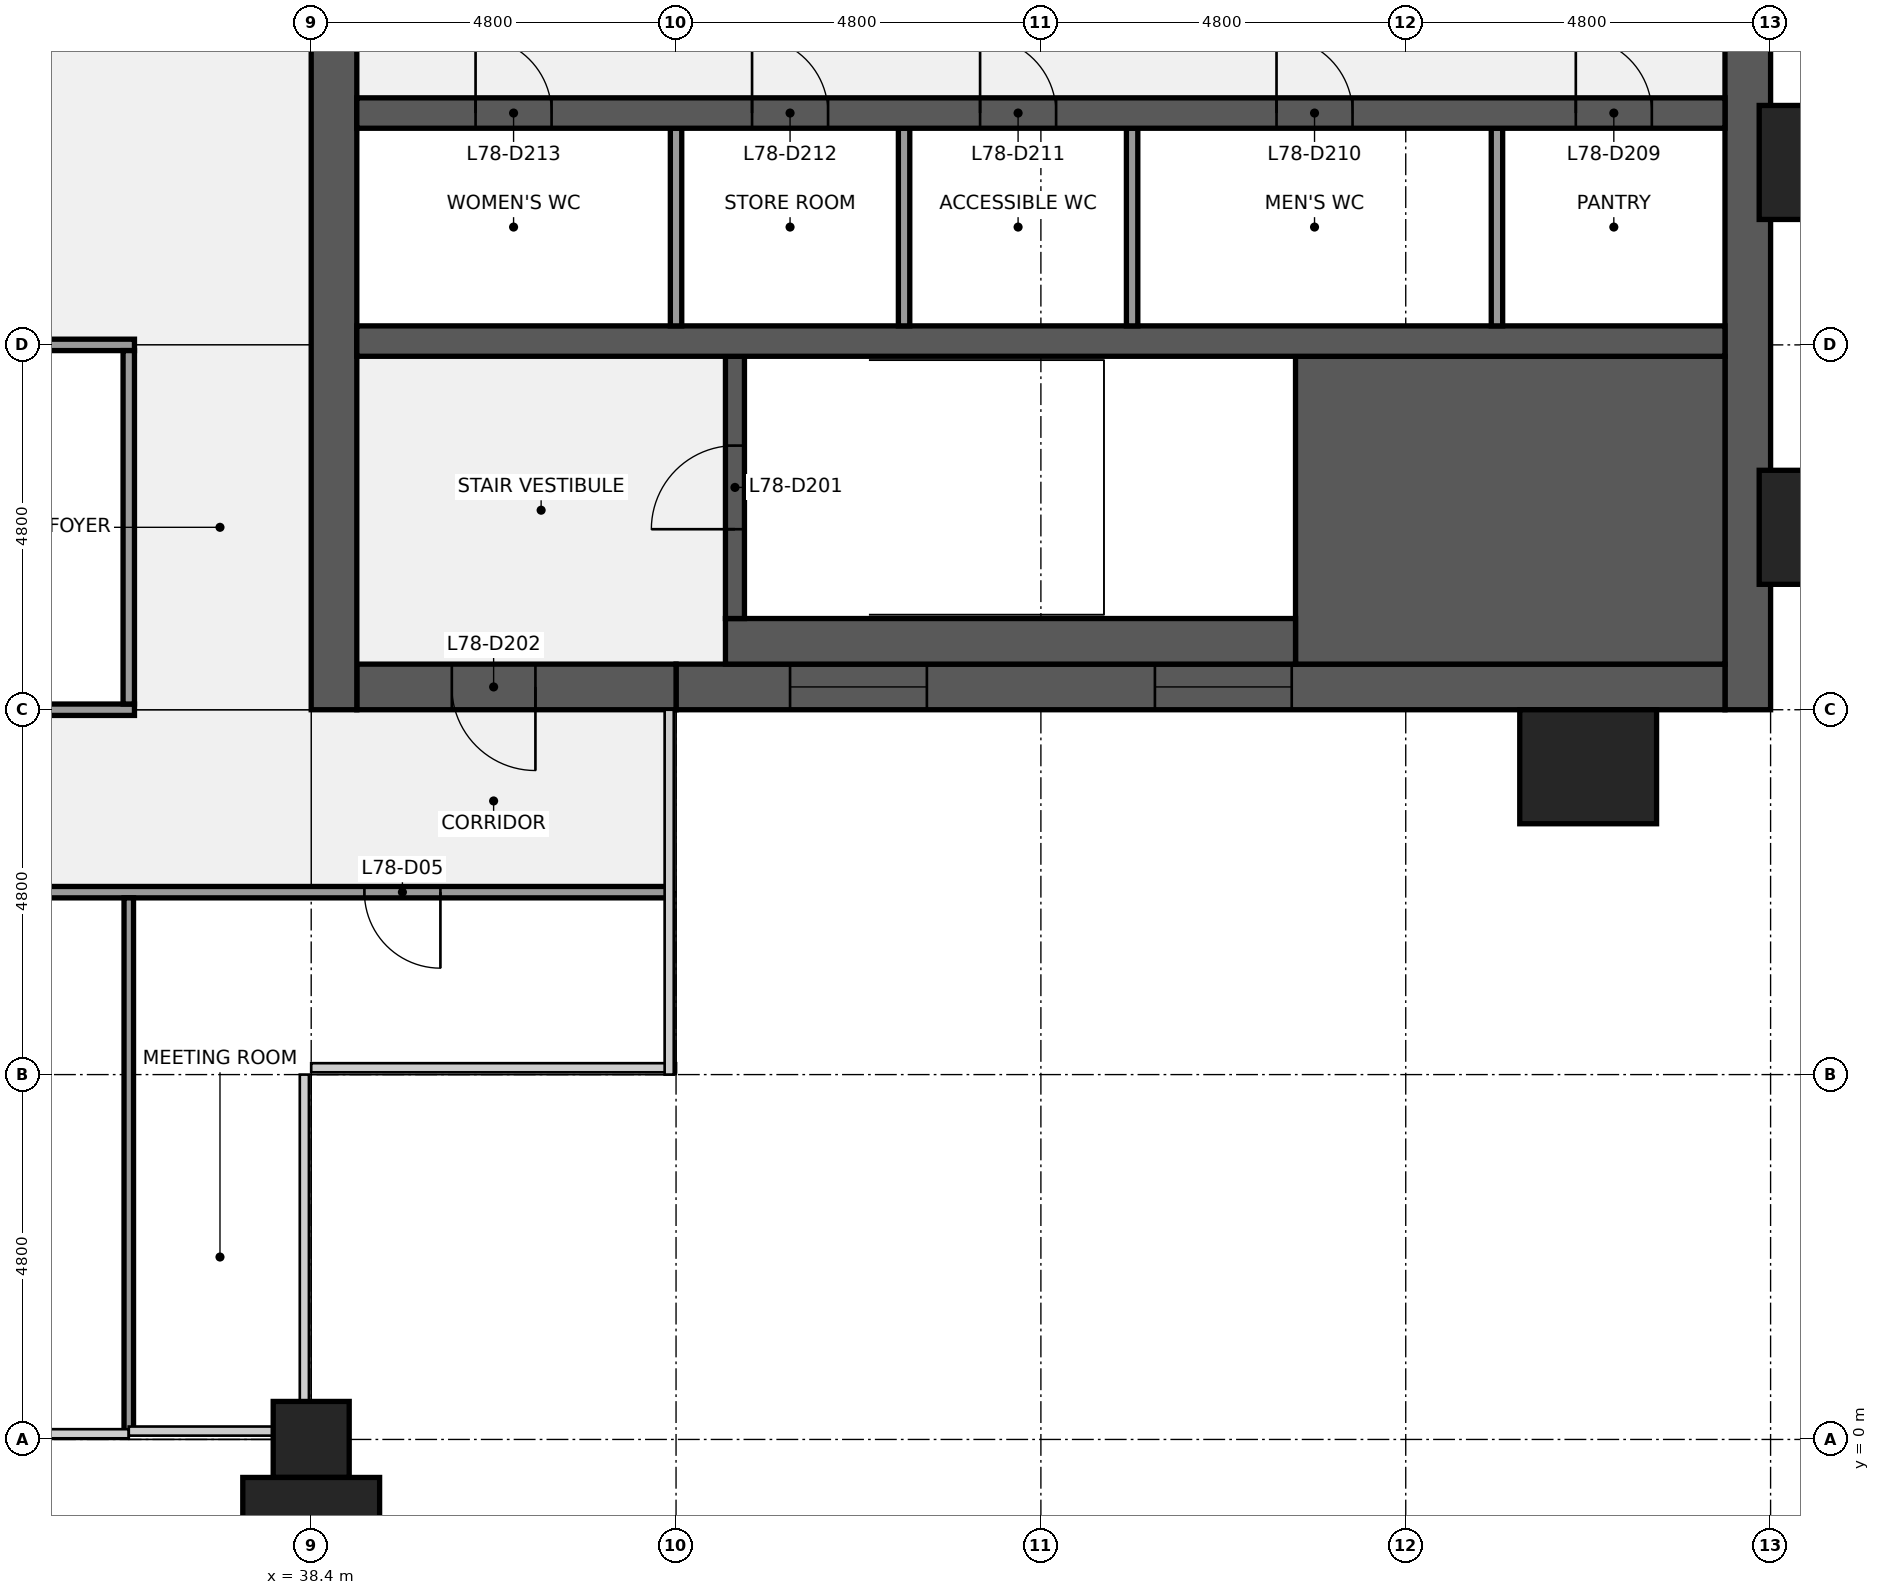
"""IFC4 building model, lengths in metres.
Left out: names, types, materials, properties, quantities, classifications, styles, units other than length and angle.
Written with IfcOpenShell. Run it as: python <this file> out.ifc"""

import sys

from ifc_helpers import new_model, si_unit, direction, frame, frame_2d, origin, origin_2d, place, context, subcontext, project, spatial, rectangle, extrude, element, fill, save


model = new_model("IFC4")
c1 = context("Model", 3, precision=1e-05, world=origin(), true_north=direction((0.0, 1.0)))
c2 = subcontext(c1, "Body", "Model", "MODEL_VIEW")
j1 = project(units=[si_unit("LENGTHUNIT", "METRE"), si_unit("PLANEANGLEUNIT", "RADIAN")], contexts=[c1])
p1 = place(None, origin())
s1 = spatial("IfcSite", under=j1, at=p1, CompositionType="ELEMENT")
p2 = place(p1, origin())
s2 = spatial("IfcBuilding", under=s1, at=p2, CompositionType="ELEMENT")
p3 = place(p2, frame((0.0, 0.0, 350.3)))
s3 = spatial("IfcBuildingStorey", under=s2, at=p3, CompositionType="ELEMENT", Elevation=350.3)
p4 = place(p3, frame((38.4, 0.0, 0.0), z_axis=(0.0, 0.0, 1.0), x_axis=(1.0, 0.0, 0.0)))
e1 = element("IfcColumn", 1, at=p4, inside=s3, PredefinedType="COLUMN", context=c2, shape_type="SweptSolid", body=[
    extrude(rectangle(XDim=1.0, YDim=1.0, at=origin_2d()), origin(), (0.0, 0.0, 1.0), 4.0),
])
p5 = place(p3, frame((57.3, 38.4, 0.0), z_axis=(0.0, 0.0, 1.0), x_axis=(0.0, -1.0, 0.0)))
e2 = element("IfcWall", 2, at=p5, inside=s3, PredefinedType="SHEAR", context=c2, shape_type="SweptSolid", body=[
    extrude(rectangle(XDim=28.8, YDim=0.6, at=frame_2d((14.4, 0.0))), origin(), (0.0, 0.0, 1.0), 3.75),
])
p6 = place(p5, frame((18.45, 0.0, 0.9)))
e3 = element("IfcOpeningElement", 3, at=p6, cuts=e2, PredefinedType="OPENING", context=c2, shape_type="SweptSolid", body=[
    extrude(rectangle(XDim=1.5, YDim=1.5, at=frame_2d((0.75, 0.75))), frame((0.0, 0.31, 0.0), z_axis=(0.0, -1.0, 0.0), x_axis=(1.0, 0.0, 0.0)), (0.0, 0.0, 1.0), 0.62),
])
p7 = place(p5, frame((8.85, 0.0, 0.9)))
e4 = element("IfcOpeningElement", 4, at=p7, cuts=e2, PredefinedType="OPENING", context=c2, shape_type="SweptSolid", body=[
    extrude(rectangle(XDim=1.5, YDim=1.5, at=frame_2d((0.75, 0.75))), frame((0.0, 0.31, 0.0), z_axis=(0.0, -1.0, 0.0), x_axis=(1.0, 0.0, 0.0)), (0.0, 0.0, 1.0), 0.62),
])
p8 = place(p3, frame((57.0, 9.9, 0.0), z_axis=(0.0, 0.0, 1.0), x_axis=(-1.0, 0.0, 0.0)))
e5 = element("IfcWall", 5, at=p8, inside=s3, PredefinedType="SHEAR", context=c2, shape_type="SweptSolid", body=[
    extrude(rectangle(XDim=13.8, YDim=0.6, at=frame_2d((6.9, 0.0))), origin(), (0.0, 0.0, 1.0), 3.75),
])
p9 = place(p8, frame((5.7, 0.0, 0.9)))
e6 = element("IfcOpeningElement", 6, at=p9, cuts=e5, PredefinedType="OPENING", context=c2, shape_type="SweptSolid", body=[
    extrude(rectangle(XDim=1.8, YDim=1.5, at=frame_2d((0.9, 0.75))), frame((0.0, 0.31, 0.0), z_axis=(0.0, -1.0, 0.0), x_axis=(1.0, 0.0, 0.0)), (0.0, 0.0, 1.0), 0.62),
])
p10 = place(p8, frame((10.5, 0.0, 0.9)))
e7 = element("IfcOpeningElement", 7, at=p10, cuts=e5, PredefinedType="OPENING", context=c2, shape_type="SweptSolid", body=[
    extrude(rectangle(XDim=1.8, YDim=1.5, at=frame_2d((0.9, 0.75))), frame((0.0, 0.31, 0.0), z_axis=(0.0, -1.0, 0.0), x_axis=(1.0, 0.0, 0.0)), (0.0, 0.0, 1.0), 0.62),
])
p11 = place(p3, frame((43.2, 9.9, 0.0), z_axis=(0.0, 0.0, 1.0), x_axis=(-1.0, 0.0, 0.0)))
e8 = element("IfcWall", 8, at=p11, inside=s3, PredefinedType="SHEAR", context=c2, shape_type="SweptSolid", body=[
    extrude(rectangle(XDim=4.2, YDim=0.6, at=frame_2d((2.1, 0.0))), origin(), (0.0, 0.0, 1.0), 3.75),
])
p12 = place(p11, frame((1.85, 0.0, 0.0)))
e9 = element("IfcOpeningElement", 9, at=p12, cuts=e8, PredefinedType="OPENING", context=c2, shape_type="SweptSolid", body=[
    extrude(rectangle(XDim=1.1, YDim=2.1, at=frame_2d((0.55, 1.05))), frame((0.0, 0.31, 0.0), z_axis=(0.0, -1.0, 0.0), x_axis=(1.0, 0.0, 0.0)), (0.0, 0.0, 1.0), 0.62),
])
p13 = place(p3, frame((38.7, 9.6, 0.0), z_axis=(0.0, 0.0, 1.0), x_axis=(0.0, 1.0, 0.0)))
e10 = element("IfcWall", 10, at=p13, inside=s3, PredefinedType="SHEAR", context=c2, shape_type="SweptSolid", body=[
    extrude(rectangle(XDim=28.8, YDim=0.6, at=frame_2d((14.4, 0.0))), origin(), (0.0, 0.0, 1.0), 3.75),
])
p14 = place(p13, frame((8.7, 0.0, 0.0)))
e11 = element("IfcOpeningElement", 11, at=p14, cuts=e10, PredefinedType="OPENING", context=c2, shape_type="SweptSolid", body=[
    extrude(rectangle(XDim=1.8, YDim=2.1, at=frame_2d((0.9, 1.05))), frame((0.0, 0.31, 0.0), z_axis=(0.0, -1.0, 0.0), x_axis=(1.0, 0.0, 0.0)), (0.0, 0.0, 1.0), 0.62),
])
p15 = place(p13, frame((18.3, 0.0, 0.0)))
e12 = element("IfcOpeningElement", 12, at=p15, cuts=e10, PredefinedType="OPENING", context=c2, shape_type="SweptSolid", body=[
    extrude(rectangle(XDim=1.8, YDim=2.1, at=frame_2d((0.9, 1.05))), frame((0.0, 0.31, 0.0), z_axis=(0.0, -1.0, 0.0), x_axis=(1.0, 0.0, 0.0)), (0.0, 0.0, 1.0), 0.62),
])
p16 = place(p3, frame((51.35, 12.225, 0.0), z_axis=(0.0, 0.0, 1.0), x_axis=(1.0, 0.0, 0.0)))
e13 = element("IfcWall", 13, at=p16, inside=s3, PredefinedType="SHEAR", context=c2, shape_type="SweptSolid", body=[
    extrude(rectangle(XDim=5.65, YDim=4.05, at=frame_2d((2.825, 0.0))), origin(), (0.0, 0.0, 1.0), 3.75),
])
p17 = place(p3, frame((43.85, 10.5, 0.0), z_axis=(0.0, 0.0, 1.0), x_axis=(1.0, 0.0, 0.0)))
e14 = element("IfcWall", 14, at=p17, inside=s3, PredefinedType="SHEAR", context=c2, shape_type="SweptSolid", body=[
    extrude(rectangle(XDim=7.5, YDim=0.6, at=frame_2d((3.75, 0.0))), origin(), (0.0, 0.0, 1.0), 3.75),
])
p18 = place(p3, frame((43.975, 10.8, 0.0), z_axis=(0.0, 0.0, 1.0), x_axis=(0.0, 1.0, 0.0)))
e15 = element("IfcWall", 15, at=p18, inside=s3, PredefinedType="SHEAR", context=c2, shape_type="SweptSolid", body=[
    extrude(rectangle(XDim=3.45, YDim=0.25, at=frame_2d((1.725, 0.0))), origin(), (0.0, 0.0, 1.0), 3.75),
])
p19 = place(p18, frame((1.175, 0.0, 0.0)))
e16 = element("IfcOpeningElement", 16, at=p19, cuts=e15, PredefinedType="OPENING", context=c2, shape_type="SweptSolid", body=[
    extrude(rectangle(XDim=1.1, YDim=2.1, at=frame_2d((0.55, 1.05))), frame((0.0, 0.135, 0.0), z_axis=(0.0, -1.0, 0.0), x_axis=(1.0, 0.0, 0.0)), (0.0, 0.0, 1.0), 0.27),
])
p20 = place(p3, frame((39.0, 14.45, 0.0), z_axis=(0.0, 0.0, 1.0), x_axis=(1.0, 0.0, 0.0)))
e17 = element("IfcWall", 17, at=p20, inside=s3, PredefinedType="SHEAR", context=c2, shape_type="SweptSolid", body=[
    extrude(rectangle(XDim=18.0, YDim=0.4, at=frame_2d((9.0, 0.0))), origin(), (0.0, 0.0, 1.0), 3.75),
])
for number, where, z_axis, x_axis in (
    (18, (54.0, 14.65, 0.0), (0.0, 0.0, 1.0), (0.0, 1.0, 0.0)),
    (19, (49.2, 14.65, 0.0), (0.0, 0.0, 1.0), (0.0, 1.0, 0.0)),
    (20, (46.2, 14.65, 0.0), (0.0, 0.0, 1.0), (0.0, 1.0, 0.0)),
    (21, (43.2, 14.65, 0.0), (0.0, 0.0, 1.0), (0.0, 1.0, 0.0)),
):
    element("IfcWall", number, at=place(p3, frame(where, z_axis=z_axis, x_axis=x_axis)), inside=s3, PredefinedType="PARTITIONING", context=c2, shape_type="SweptSolid", body=[
        extrude(rectangle(XDim=2.6, YDim=0.15, at=frame_2d((1.3, 0.0))), origin(), (0.0, 0.0, 1.0), 3.75),
    ])
p21 = place(p3, frame((39.0, 17.45, 0.0), z_axis=(0.0, 0.0, 1.0), x_axis=(1.0, 0.0, 0.0)))
e22 = element("IfcWall", 22, at=p21, inside=s3, PredefinedType="SHEAR", context=c2, shape_type="SweptSolid", body=[
    extrude(rectangle(XDim=18.0, YDim=0.4, at=frame_2d((9.0, 0.0))), origin(), (0.0, 0.0, 1.0), 3.75),
])
p22 = place(p21, frame((16.038, 0.0, 0.0)))
e23 = element("IfcOpeningElement", 23, at=p22, cuts=e22, PredefinedType="OPENING", context=c2, shape_type="SweptSolid", body=[
    extrude(rectangle(XDim=1.0, YDim=2.1, at=frame_2d((0.5, 1.05))), frame((0.0, 0.21, 0.0), z_axis=(0.0, -1.0, 0.0), x_axis=(1.0, 0.0, 0.0)), (0.0, 0.0, 1.0), 0.42),
])
p23 = place(p21, frame((12.1, 0.0, 0.0)))
e24 = element("IfcOpeningElement", 24, at=p23, cuts=e22, PredefinedType="OPENING", context=c2, shape_type="SweptSolid", body=[
    extrude(rectangle(XDim=1.0, YDim=2.1, at=frame_2d((0.5, 1.05))), frame((0.0, 0.21, 0.0), z_axis=(0.0, -1.0, 0.0), x_axis=(1.0, 0.0, 0.0)), (0.0, 0.0, 1.0), 0.42),
])
p24 = place(p21, frame((8.2, 0.0, 0.0)))
e25 = element("IfcOpeningElement", 25, at=p24, cuts=e22, PredefinedType="OPENING", context=c2, shape_type="SweptSolid", body=[
    extrude(rectangle(XDim=1.0, YDim=2.1, at=frame_2d((0.5, 1.05))), frame((0.0, 0.21, 0.0), z_axis=(0.0, -1.0, 0.0), x_axis=(1.0, 0.0, 0.0)), (0.0, 0.0, 1.0), 0.42),
])
p25 = place(p21, frame((5.2, 0.0, 0.0)))
e26 = element("IfcOpeningElement", 26, at=p25, cuts=e22, PredefinedType="OPENING", context=c2, shape_type="SweptSolid", body=[
    extrude(rectangle(XDim=1.0, YDim=2.1, at=frame_2d((0.5, 1.05))), frame((0.0, 0.21, 0.0), z_axis=(0.0, -1.0, 0.0), x_axis=(1.0, 0.0, 0.0)), (0.0, 0.0, 1.0), 0.42),
])
p26 = place(p21, frame((1.562, 0.0, 0.0)))
e27 = element("IfcOpeningElement", 27, at=p26, cuts=e22, PredefinedType="OPENING", context=c2, shape_type="SweptSolid", body=[
    extrude(rectangle(XDim=1.0, YDim=2.1, at=frame_2d((0.5, 1.05))), frame((0.0, 0.21, 0.0), z_axis=(0.0, -1.0, 0.0), x_axis=(1.0, 0.0, 0.0)), (0.0, 0.0, 1.0), 0.42),
])
p27 = place(p3, frame((14.5, 7.2, 0.0), z_axis=(0.0, 0.0, 1.0), x_axis=(1.0, 0.0, 0.0)))
e28 = element("IfcWall", 28, at=p27, inside=s3, PredefinedType="PARTITIONING", context=c2, shape_type="SweptSolid", body=[
    extrude(rectangle(XDim=28.6, YDim=0.15, at=frame_2d((14.3, 0.0))), origin(), (0.0, 0.0, 1.0), 2.759),
])
p28 = place(p27, frame((1.85, 0.0, 0.0)))
e29 = element("IfcOpeningElement", 29, at=p28, cuts=e28, PredefinedType="OPENING", context=c2, shape_type="SweptSolid", body=[
    extrude(rectangle(XDim=1.0, YDim=2.1, at=frame_2d((0.5, 1.05))), frame((0.0, 0.085, 0.0), z_axis=(0.0, -1.0, 0.0), x_axis=(1.0, 0.0, 0.0)), (0.0, 0.0, 1.0), 0.17),
])
p29 = place(p27, frame((9.0, 0.0, 0.0)))
e30 = element("IfcOpeningElement", 30, at=p29, cuts=e28, PredefinedType="OPENING", context=c2, shape_type="SweptSolid", body=[
    extrude(rectangle(XDim=1.0, YDim=2.1, at=frame_2d((0.5, 1.05))), frame((0.0, 0.085, 0.0), z_axis=(0.0, -1.0, 0.0), x_axis=(1.0, 0.0, 0.0)), (0.0, 0.0, 1.0), 0.17),
])
p30 = place(p27, frame((15.0, 0.0, 0.0)))
e31 = element("IfcOpeningElement", 31, at=p30, cuts=e28, PredefinedType="OPENING", context=c2, shape_type="SweptSolid", body=[
    extrude(rectangle(XDim=1.0, YDim=2.1, at=frame_2d((0.5, 1.05))), frame((0.0, 0.085, 0.0), z_axis=(0.0, -1.0, 0.0), x_axis=(1.0, 0.0, 0.0)), (0.0, 0.0, 1.0), 0.17),
])
p31 = place(p27, frame((18.6, 0.0, 0.0)))
e32 = element("IfcOpeningElement", 32, at=p31, cuts=e28, PredefinedType="OPENING", context=c2, shape_type="SweptSolid", body=[
    extrude(rectangle(XDim=1.0, YDim=2.1, at=frame_2d((0.5, 1.05))), frame((0.0, 0.085, 0.0), z_axis=(0.0, -1.0, 0.0), x_axis=(1.0, 0.0, 0.0)), (0.0, 0.0, 1.0), 0.17),
])
p32 = place(p27, frame((24.6, 0.0, 0.0)))
e33 = element("IfcOpeningElement", 33, at=p32, cuts=e28, PredefinedType="OPENING", context=c2, shape_type="SweptSolid", body=[
    extrude(rectangle(XDim=1.0, YDim=2.1, at=frame_2d((0.5, 1.05))), frame((0.0, 0.085, 0.0), z_axis=(0.0, -1.0, 0.0), x_axis=(1.0, 0.0, 0.0)), (0.0, 0.0, 1.0), 0.17),
])
p33 = place(p3, frame((21.525, 9.6, 0.0), z_axis=(0.0, 0.0, 1.0), x_axis=(1.0, 0.0, 0.0)))
e34 = element("IfcWall", 34, at=p33, inside=s3, PredefinedType="PARTITIONING", context=c2, shape_type="SweptSolid", body=[
    extrude(rectangle(XDim=14.55, YDim=0.15, at=frame_2d((7.275, 0.0))), origin(), (0.0, 0.0, 1.0), 2.759),
])
p34 = place(p33, frame((3.775, 0.0, 0.0)))
e35 = element("IfcOpeningElement", 35, at=p34, cuts=e34, PredefinedType="OPENING", context=c2, shape_type="SweptSolid", body=[
    extrude(rectangle(XDim=1.0, YDim=2.1, at=frame_2d((0.5, 1.05))), frame((0.0, 0.085, 0.0), z_axis=(0.0, -1.0, 0.0), x_axis=(1.0, 0.0, 0.0)), (0.0, 0.0, 1.0), 0.17),
])
p35 = place(p33, frame((10.975, 0.0, 0.0)))
e36 = element("IfcOpeningElement", 36, at=p35, cuts=e34, PredefinedType="OPENING", context=c2, shape_type="SweptSolid", body=[
    extrude(rectangle(XDim=1.0, YDim=2.1, at=frame_2d((0.5, 1.05))), frame((0.0, 0.085, 0.0), z_axis=(0.0, -1.0, 0.0), x_axis=(1.0, 0.0, 0.0)), (0.0, 0.0, 1.0), 0.17),
])
p36 = place(p3, frame((33.675, 14.4, 0.0), z_axis=(0.0, 0.0, 1.0), x_axis=(1.0, 0.0, 0.0)))
e37 = element("IfcWall", 37, at=p36, inside=s3, PredefinedType="PARTITIONING", context=c2, shape_type="SweptSolid", body=[
    extrude(rectangle(XDim=2.4, YDim=0.15, at=frame_2d((1.2, 0.0))), origin(), (0.0, 0.0, 1.0), 2.759),
])
p37 = place(p3, frame((36.0, 0.1, 0.0), z_axis=(0.0, 0.0, 1.0), x_axis=(0.0, 1.0, 0.0)))
e38 = element("IfcWall", 38, at=p37, inside=s3, PredefinedType="PARTITIONING", context=c2, shape_type="SweptSolid", body=[
    extrude(rectangle(XDim=7.025, YDim=0.125, at=frame_2d((3.512, 0.0))), origin(), (0.0, 0.0, 1.0), 2.759),
])
p38 = place(p3, frame((36.0, 9.675, 0.0), z_axis=(0.0, 0.0, 1.0), x_axis=(0.0, 1.0, 0.0)))
e39 = element("IfcWall", 39, at=p38, inside=s3, PredefinedType="PARTITIONING", context=c2, shape_type="SweptSolid", body=[
    extrude(rectangle(XDim=4.65, YDim=0.15, at=frame_2d((2.325, 0.0))), origin(), (0.0, 0.0, 1.0), 2.759),
])
for number, where, z_axis, x_axis in (
    (40, (55.2, 8.85, 0.0), (0.0, 0.0, 1.0), (1.0, 0.0, 0.0)),
    (41, (58.35, 12.0, 0.0), (0.0, 0.0, 1.0), (0.0, 1.0, 0.0)),
    (42, (58.35, 16.8, 0.0), (0.0, 0.0, 1.0), (0.0, 1.0, 0.0)),
):
    element("IfcColumn", number, at=place(p3, frame(where, z_axis=z_axis, x_axis=x_axis)), inside=s3, PredefinedType="PILASTER", context=c2, shape_type="SweptSolid", body=[
        extrude(rectangle(XDim=1.8, YDim=1.5, at=origin_2d()), origin(), (0.0, 0.0, 1.0), 4.0),
    ])
p39 = place(p3, frame((38.4, -1.0, 0.0), z_axis=(0.0, 0.0, 1.0), x_axis=(1.0, 0.0, 0.0)))
e43 = element("IfcColumn", 43, at=p39, inside=s3, PredefinedType="PILASTER", context=c2, shape_type="SweptSolid", body=[
    extrude(rectangle(XDim=1.8, YDim=1.0, at=origin_2d()), origin(), (0.0, 0.0, 1.0), 4.0),
])
p40 = place(p19, origin())
e44 = element("IfcDoor", 44, at=p40, inside=s3, OperationType="SINGLE_SWING_LEFT", PredefinedType="DOOR", context=c2, shape_type="SweptSolid", body=[
    extrude(rectangle(XDim=1.1, YDim=2.1, at=frame_2d((0.55, 1.05))), frame((0.0, 0.025, 0.0), z_axis=(0.0, -1.0, 0.0), x_axis=(1.0, 0.0, 0.0)), (0.0, 0.0, 1.0), 0.05),
])
fill(e16, e44)
p41 = place(p12, origin())
e45 = element("IfcDoor", 45, at=p41, inside=s3, OperationType="SINGLE_SWING_LEFT", PredefinedType="DOOR", context=c2, shape_type="SweptSolid", body=[
    extrude(rectangle(XDim=1.1, YDim=2.1, at=frame_2d((0.55, 1.05))), frame((0.0, 0.025, 0.0), z_axis=(0.0, -1.0, 0.0), x_axis=(1.0, 0.0, 0.0)), (0.0, 0.0, 1.0), 0.05),
])
fill(e9, e45)
p42 = place(p22, origin())
e46 = element("IfcDoor", 46, at=p42, inside=s3, OperationType="SINGLE_SWING_LEFT", PredefinedType="DOOR", context=c2, shape_type="SweptSolid", body=[
    extrude(rectangle(XDim=1.0, YDim=2.1, at=frame_2d((0.5, 1.05))), frame((0.0, 0.025, 0.0), z_axis=(0.0, -1.0, 0.0), x_axis=(1.0, 0.0, 0.0)), (0.0, 0.0, 1.0), 0.05),
])
fill(e23, e46)
p43 = place(p23, origin())
e47 = element("IfcDoor", 47, at=p43, inside=s3, OperationType="SINGLE_SWING_LEFT", PredefinedType="DOOR", context=c2, shape_type="SweptSolid", body=[
    extrude(rectangle(XDim=1.0, YDim=2.1, at=frame_2d((0.5, 1.05))), frame((0.0, 0.025, 0.0), z_axis=(0.0, -1.0, 0.0), x_axis=(1.0, 0.0, 0.0)), (0.0, 0.0, 1.0), 0.05),
])
fill(e24, e47)
p44 = place(p24, origin())
e48 = element("IfcDoor", 48, at=p44, inside=s3, OperationType="SINGLE_SWING_LEFT", PredefinedType="DOOR", context=c2, shape_type="SweptSolid", body=[
    extrude(rectangle(XDim=1.0, YDim=2.1, at=frame_2d((0.5, 1.05))), frame((0.0, 0.025, 0.0), z_axis=(0.0, -1.0, 0.0), x_axis=(1.0, 0.0, 0.0)), (0.0, 0.0, 1.0), 0.05),
])
fill(e25, e48)
p45 = place(p25, origin())
e49 = element("IfcDoor", 49, at=p45, inside=s3, OperationType="SINGLE_SWING_LEFT", PredefinedType="DOOR", context=c2, shape_type="SweptSolid", body=[
    extrude(rectangle(XDim=1.0, YDim=2.1, at=frame_2d((0.5, 1.05))), frame((0.0, 0.025, 0.0), z_axis=(0.0, -1.0, 0.0), x_axis=(1.0, 0.0, 0.0)), (0.0, 0.0, 1.0), 0.05),
])
fill(e26, e49)
p46 = place(p26, origin())
e50 = element("IfcDoor", 50, at=p46, inside=s3, OperationType="SINGLE_SWING_LEFT", PredefinedType="DOOR", context=c2, shape_type="SweptSolid", body=[
    extrude(rectangle(XDim=1.0, YDim=2.1, at=frame_2d((0.5, 1.05))), frame((0.0, 0.025, 0.0), z_axis=(0.0, -1.0, 0.0), x_axis=(1.0, 0.0, 0.0)), (0.0, 0.0, 1.0), 0.05),
])
fill(e27, e50)
p47 = place(p9, origin())
e51 = element("IfcWindow", 51, at=p47, inside=s3, PartitioningType="SINGLE_PANEL", PredefinedType="WINDOW", context=c2, shape_type="SweptSolid", body=[
    extrude(rectangle(XDim=1.8, YDim=1.5, at=frame_2d((0.9, 0.75))), frame((0.0, 0.03, 0.0), z_axis=(0.0, -1.0, 0.0), x_axis=(1.0, 0.0, 0.0)), (0.0, 0.0, 1.0), 0.06),
])
fill(e6, e51)
p48 = place(p10, origin())
e52 = element("IfcWindow", 52, at=p48, inside=s3, PartitioningType="SINGLE_PANEL", PredefinedType="WINDOW", context=c2, shape_type="SweptSolid", body=[
    extrude(rectangle(XDim=1.8, YDim=1.5, at=frame_2d((0.9, 0.75))), frame((0.0, 0.03, 0.0), z_axis=(0.0, -1.0, 0.0), x_axis=(1.0, 0.0, 0.0)), (0.0, 0.0, 1.0), 0.06),
])
fill(e7, e52)
p49 = place(p32, origin())
e53 = element("IfcDoor", 53, at=p49, inside=s3, OperationType="SINGLE_SWING_RIGHT", PredefinedType="DOOR", context=c2, shape_type="SweptSolid", body=[
    extrude(rectangle(XDim=1.0, YDim=2.1, at=frame_2d((0.5, 1.05))), frame((0.0, 0.025, 0.0), z_axis=(0.0, -1.0, 0.0), x_axis=(1.0, 0.0, 0.0)), (0.0, 0.0, 1.0), 0.05),
])
fill(e33, e53)
save(model, sys.argv[1])
